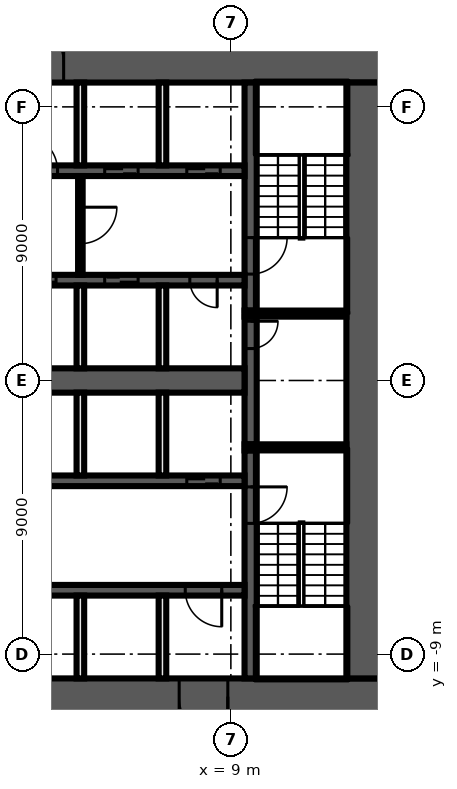
"""IFC4 building model, lengths in metres.
Left out: names, types, materials, properties, quantities, classifications, styles, units other than length and angle.
Written with IfcOpenShell. Run it as: python <this file> out.ifc"""

import sys

from ifc_helpers import new_model, si_unit, direction, frame, frame_2d, origin, place, context, subcontext, project, spatial, rectangle, extrude, element, fill, save


model = new_model("IFC4")
c1 = context("Model", 3, precision=1e-05, world=origin(), true_north=direction((0.0, 1.0)))
c2 = subcontext(c1, "Body", "Model", "MODEL_VIEW")
j1 = project(units=[si_unit("LENGTHUNIT", "METRE"), si_unit("PLANEANGLEUNIT", "RADIAN")], contexts=[c1])
p1 = place(None, origin())
s1 = spatial("IfcSite", under=j1, at=p1, CompositionType="ELEMENT")
p2 = place(p1, origin())
s2 = spatial("IfcBuilding", under=s1, at=p2, CompositionType="ELEMENT")
p3 = place(p2, frame((0.0, 0.0, 27.0)))
s3 = spatial("IfcBuildingStorey", under=s2, at=p3, CompositionType="ELEMENT", Elevation=27.0)
p4 = place(p3, frame((-14.0, 10.4, 0.0), z_axis=(0.0, 0.0, 1.0), x_axis=(1.0, 0.0, 0.0)))
e1 = element("IfcWall", 1, at=p4, inside=s3, PredefinedType="SHEAR", context=c2, shape_type="SweptSolid", body=[
    extrude(rectangle(XDim=28.0, YDim=1.2, at=frame_2d((14.0, 0.0))), origin(), (0.0, 0.0, 1.0), 5.55),
])
p5 = place(p4, frame((15.9, 0.0, 0.0)))
e2 = element("IfcOpeningElement", 2, at=p5, cuts=e1, PredefinedType="OPENING", context=c2, shape_type="SweptSolid", body=[
    extrude(rectangle(XDim=1.6, YDim=2.1, at=frame_2d((0.8, 1.05))), frame((0.0, 0.61, 0.0), z_axis=(0.0, -1.0, 0.0), x_axis=(1.0, 0.0, 0.0)), (0.0, 0.0, 1.0), 1.22),
])
p6 = place(p3, frame((14.0, -10.4, 0.0), z_axis=(0.0, 0.0, 1.0), x_axis=(-1.0, 0.0, 0.0)))
e3 = element("IfcWall", 3, at=p6, inside=s3, PredefinedType="SHEAR", context=c2, shape_type="SweptSolid", body=[
    extrude(rectangle(XDim=28.0, YDim=1.2, at=frame_2d((14.0, 0.0))), origin(), (0.0, 0.0, 1.0), 5.55),
])
p7 = place(p6, frame((5.1, 0.0, 0.0)))
e4 = element("IfcOpeningElement", 4, at=p7, cuts=e3, PredefinedType="OPENING", context=c2, shape_type="SweptSolid", body=[
    extrude(rectangle(XDim=1.6, YDim=2.1, at=frame_2d((0.8, 1.05))), frame((0.0, 0.61, 0.0), z_axis=(0.0, -1.0, 0.0), x_axis=(1.0, 0.0, 0.0)), (0.0, 0.0, 1.0), 1.22),
])
p8 = place(p3, frame((13.4, 9.8, 0.0), z_axis=(0.0, 0.0, 1.0), x_axis=(0.0, -1.0, 0.0)))
e5 = element("IfcWall", 5, at=p8, inside=s3, PredefinedType="SHEAR", context=c2, shape_type="SweptSolid", body=[
    extrude(rectangle(XDim=19.6, YDim=1.2, at=frame_2d((9.8, 0.0))), origin(), (0.0, 0.0, 1.0), 5.55),
])
p9 = place(p3, frame((9.65, -2.3, 0.0), z_axis=(0.0, 0.0, 1.0), x_axis=(0.0, -1.0, 0.0)))
e6 = element("IfcWall", 6, at=p9, inside=s3, PredefinedType="SHEAR", context=c2, shape_type="SweptSolid", body=[
    extrude(rectangle(XDim=7.5, YDim=0.4, at=frame_2d((3.75, 0.0))), origin(), (0.0, 0.0, 1.0), 5.55),
])
p10 = place(p9, frame((1.2, 0.0, 0.0)))
e7 = element("IfcOpeningElement", 7, at=p10, cuts=e6, PredefinedType="OPENING", context=c2, shape_type="SweptSolid", body=[
    extrude(rectangle(XDim=1.2, YDim=2.1, at=frame_2d((0.6, 1.05))), frame((0.0, 0.21, 0.0), z_axis=(0.0, -1.0, 0.0), x_axis=(1.0, 0.0, 0.0)), (0.0, 0.0, 1.0), 0.42),
])
p11 = place(p3, frame((9.65, 2.1, 0.0), z_axis=(0.0, 0.0, 1.0), x_axis=(0.0, -1.0, 0.0)))
e8 = element("IfcWall", 8, at=p11, inside=s3, PredefinedType="SHEAR", context=c2, shape_type="SweptSolid", body=[
    extrude(rectangle(XDim=4.2, YDim=0.4, at=frame_2d((2.1, 0.0))), origin(), (0.0, 0.0, 1.0), 5.55),
])
p12 = place(p11, frame((0.15, 0.0, 0.0)))
e9 = element("IfcOpeningElement", 9, at=p12, cuts=e8, PredefinedType="OPENING", context=c2, shape_type="SweptSolid", body=[
    extrude(rectangle(XDim=0.9, YDim=2.1, at=frame_2d((0.45, 1.05))), frame((0.0, 0.21, 0.0), z_axis=(0.0, -1.0, 0.0), x_axis=(1.0, 0.0, 0.0)), (0.0, 0.0, 1.0), 0.42),
])
p13 = place(p3, frame((9.65, 9.8, 0.0), z_axis=(0.0, 0.0, 1.0), x_axis=(0.0, -1.0, 0.0)))
e10 = element("IfcWall", 10, at=p13, inside=s3, PredefinedType="SHEAR", context=c2, shape_type="SweptSolid", body=[
    extrude(rectangle(XDim=7.5, YDim=0.4, at=frame_2d((3.75, 0.0))), origin(), (0.0, 0.0, 1.0), 5.55),
])
p14 = place(p13, frame((5.1, 0.0, 0.0)))
e11 = element("IfcOpeningElement", 11, at=p14, cuts=e10, PredefinedType="OPENING", context=c2, shape_type="SweptSolid", body=[
    extrude(rectangle(XDim=1.2, YDim=2.1, at=frame_2d((0.6, 1.05))), frame((0.0, 0.21, 0.0), z_axis=(0.0, -1.0, 0.0), x_axis=(1.0, 0.0, 0.0)), (0.0, 0.0, 1.0), 0.42),
])
for number, where, z_axis, x_axis in (
    (12, (9.45, 2.2, 0.0), (0.0, 0.0, 1.0), (1.0, 0.0, 0.0)),
    (13, (9.45, -2.2, 0.0), (0.0, 0.0, 1.0), (1.0, 0.0, 0.0)),
):
    element("IfcWall", number, at=place(p3, frame(where, z_axis=z_axis, x_axis=x_axis)), inside=s3, PredefinedType="SHEAR", context=c2, shape_type="SweptSolid", body=[
        extrude(rectangle(XDim=3.35, YDim=0.2, at=frame_2d((1.675, 0.0))), origin(), (0.0, 0.0, 1.0), 5.55),
    ])
p15 = place(p3, frame((-9.45, 6.9, 0.0), z_axis=(0.0, 0.0, 1.0), x_axis=(1.0, 0.0, 0.0)))
e14 = element("IfcWall", 14, at=p15, inside=s3, PredefinedType="SHEAR", context=c2, shape_type="SweptSolid", body=[
    extrude(rectangle(XDim=18.9, YDim=0.35, at=frame_2d((9.45, 0.0))), origin(), (0.0, 0.0, 1.0), 5.55),
])
p16 = place(p15, frame((0.8, 0.0, 0.0)))
e15 = element("IfcOpeningElement", 15, at=p16, cuts=e14, PredefinedType="OPENING", context=c2, shape_type="SweptSolid", body=[
    extrude(rectangle(XDim=1.1, YDim=2.1, at=frame_2d((0.55, 1.05))), frame((0.0, 0.185, 0.0), z_axis=(0.0, -1.0, 0.0), x_axis=(1.0, 0.0, 0.0)), (0.0, 0.0, 1.0), 0.37),
])
p17 = place(p15, frame((3.5, 0.0, 0.0)))
e16 = element("IfcOpeningElement", 16, at=p17, cuts=e14, PredefinedType="OPENING", context=c2, shape_type="SweptSolid", body=[
    extrude(rectangle(XDim=1.1, YDim=2.1, at=frame_2d((0.55, 1.05))), frame((0.0, 0.185, 0.0), z_axis=(0.0, -1.0, 0.0), x_axis=(1.0, 0.0, 0.0)), (0.0, 0.0, 1.0), 0.37),
])
p18 = place(p15, frame((6.2, 0.0, 0.0)))
e17 = element("IfcOpeningElement", 17, at=p18, cuts=e14, PredefinedType="OPENING", context=c2, shape_type="SweptSolid", body=[
    extrude(rectangle(XDim=1.1, YDim=2.1, at=frame_2d((0.55, 1.05))), frame((0.0, 0.185, 0.0), z_axis=(0.0, -1.0, 0.0), x_axis=(1.0, 0.0, 0.0)), (0.0, 0.0, 1.0), 0.37),
])
p19 = place(p15, frame((8.9, 0.0, 0.0)))
e18 = element("IfcOpeningElement", 18, at=p19, cuts=e14, PredefinedType="OPENING", context=c2, shape_type="SweptSolid", body=[
    extrude(rectangle(XDim=1.1, YDim=2.1, at=frame_2d((0.55, 1.05))), frame((0.0, 0.185, 0.0), z_axis=(0.0, -1.0, 0.0), x_axis=(1.0, 0.0, 0.0)), (0.0, 0.0, 1.0), 0.37),
])
p20 = place(p15, frame((11.55, 0.0, 0.0)))
e19 = element("IfcOpeningElement", 19, at=p20, cuts=e14, PredefinedType="OPENING", context=c2, shape_type="SweptSolid", body=[
    extrude(rectangle(XDim=1.2, YDim=2.1, at=frame_2d((0.6, 1.05))), frame((0.0, 0.185, 0.0), z_axis=(0.0, -1.0, 0.0), x_axis=(1.0, 0.0, 0.0)), (0.0, 0.0, 1.0), 0.37),
])
p21 = place(p15, frame((14.3, 0.0, 0.0)))
e20 = element("IfcOpeningElement", 20, at=p21, cuts=e14, PredefinedType="OPENING", context=c2, shape_type="SweptSolid", body=[
    extrude(rectangle(XDim=1.1, YDim=2.1, at=frame_2d((0.55, 1.05))), frame((0.0, 0.185, 0.0), z_axis=(0.0, -1.0, 0.0), x_axis=(1.0, 0.0, 0.0)), (0.0, 0.0, 1.0), 0.37),
])
p22 = place(p15, frame((17.0, 0.0, 0.0)))
e21 = element("IfcOpeningElement", 21, at=p22, cuts=e14, PredefinedType="OPENING", context=c2, shape_type="SweptSolid", body=[
    extrude(rectangle(XDim=1.1, YDim=2.1, at=frame_2d((0.55, 1.05))), frame((0.0, 0.185, 0.0), z_axis=(0.0, -1.0, 0.0), x_axis=(1.0, 0.0, 0.0)), (0.0, 0.0, 1.0), 0.37),
])
p23 = place(p3, frame((9.45, 3.3, 0.0), z_axis=(0.0, 0.0, 1.0), x_axis=(-1.0, 0.0, 0.0)))
e22 = element("IfcWall", 22, at=p23, inside=s3, PredefinedType="SHEAR", context=c2, shape_type="SweptSolid", body=[
    extrude(rectangle(XDim=18.9, YDim=0.35, at=frame_2d((9.45, 0.0))), origin(), (0.0, 0.0, 1.0), 5.55),
])
p24 = place(p23, frame((17.0, 0.0, 0.0)))
e23 = element("IfcOpeningElement", 23, at=p24, cuts=e22, PredefinedType="OPENING", context=c2, shape_type="SweptSolid", body=[
    extrude(rectangle(XDim=1.1, YDim=2.1, at=frame_2d((0.55, 1.05))), frame((0.0, 0.185, 0.0), z_axis=(0.0, -1.0, 0.0), x_axis=(1.0, 0.0, 0.0)), (0.0, 0.0, 1.0), 0.37),
])
p25 = place(p23, frame((14.3, 0.0, 0.0)))
e24 = element("IfcOpeningElement", 24, at=p25, cuts=e22, PredefinedType="OPENING", context=c2, shape_type="SweptSolid", body=[
    extrude(rectangle(XDim=1.1, YDim=2.1, at=frame_2d((0.55, 1.05))), frame((0.0, 0.185, 0.0), z_axis=(0.0, -1.0, 0.0), x_axis=(1.0, 0.0, 0.0)), (0.0, 0.0, 1.0), 0.37),
])
p26 = place(p23, frame((11.6, 0.0, 0.0)))
e25 = element("IfcOpeningElement", 25, at=p26, cuts=e22, PredefinedType="OPENING", context=c2, shape_type="SweptSolid", body=[
    extrude(rectangle(XDim=1.1, YDim=2.1, at=frame_2d((0.55, 1.05))), frame((0.0, 0.185, 0.0), z_axis=(0.0, -1.0, 0.0), x_axis=(1.0, 0.0, 0.0)), (0.0, 0.0, 1.0), 0.37),
])
p27 = place(p23, frame((8.9, 0.0, 0.0)))
e26 = element("IfcOpeningElement", 26, at=p27, cuts=e22, PredefinedType="OPENING", context=c2, shape_type="SweptSolid", body=[
    extrude(rectangle(XDim=1.1, YDim=2.1, at=frame_2d((0.55, 1.05))), frame((0.0, 0.185, 0.0), z_axis=(0.0, -1.0, 0.0), x_axis=(1.0, 0.0, 0.0)), (0.0, 0.0, 1.0), 0.37),
])
p28 = place(p23, frame((6.2, 0.0, 0.0)))
e27 = element("IfcOpeningElement", 27, at=p28, cuts=e22, PredefinedType="OPENING", context=c2, shape_type="SweptSolid", body=[
    extrude(rectangle(XDim=1.1, YDim=2.1, at=frame_2d((0.55, 1.05))), frame((0.0, 0.185, 0.0), z_axis=(0.0, -1.0, 0.0), x_axis=(1.0, 0.0, 0.0)), (0.0, 0.0, 1.0), 0.37),
])
p29 = place(p23, frame((3.5, 0.0, 0.0)))
e28 = element("IfcOpeningElement", 28, at=p29, cuts=e22, PredefinedType="OPENING", context=c2, shape_type="SweptSolid", body=[
    extrude(rectangle(XDim=1.1, YDim=2.1, at=frame_2d((0.55, 1.05))), frame((0.0, 0.185, 0.0), z_axis=(0.0, -1.0, 0.0), x_axis=(1.0, 0.0, 0.0)), (0.0, 0.0, 1.0), 0.37),
])
p30 = place(p23, frame((0.9, 0.0, 0.0)))
e29 = element("IfcOpeningElement", 29, at=p30, cuts=e22, PredefinedType="OPENING", context=c2, shape_type="SweptSolid", body=[
    extrude(rectangle(XDim=0.9, YDim=2.1, at=frame_2d((0.45, 1.05))), frame((0.0, 0.185, 0.0), z_axis=(0.0, -1.0, 0.0), x_axis=(1.0, 0.0, 0.0)), (0.0, 0.0, 1.0), 0.37),
])
p31 = place(p3, frame((-9.45, -3.3, 0.0), z_axis=(0.0, 0.0, 1.0), x_axis=(1.0, 0.0, 0.0)))
e30 = element("IfcWall", 30, at=p31, inside=s3, PredefinedType="SHEAR", context=c2, shape_type="SweptSolid", body=[
    extrude(rectangle(XDim=18.9, YDim=0.35, at=frame_2d((9.45, 0.0))), origin(), (0.0, 0.0, 1.0), 5.55),
])
p32 = place(p31, frame((17.0, 0.0, 0.0)))
e31 = element("IfcOpeningElement", 31, at=p32, cuts=e30, PredefinedType="OPENING", context=c2, shape_type="SweptSolid", body=[
    extrude(rectangle(XDim=1.1, YDim=2.1, at=frame_2d((0.55, 1.05))), frame((0.0, 0.185, 0.0), z_axis=(0.0, -1.0, 0.0), x_axis=(1.0, 0.0, 0.0)), (0.0, 0.0, 1.0), 0.37),
])
p33 = place(p31, frame((0.9, 0.0, 0.0)))
e32 = element("IfcOpeningElement", 32, at=p33, cuts=e30, PredefinedType="OPENING", context=c2, shape_type="SweptSolid", body=[
    extrude(rectangle(XDim=0.9, YDim=2.1, at=frame_2d((0.45, 1.05))), frame((0.0, 0.185, 0.0), z_axis=(0.0, -1.0, 0.0), x_axis=(1.0, 0.0, 0.0)), (0.0, 0.0, 1.0), 0.37),
])
p34 = place(p31, frame((3.6, 0.0, 0.0)))
e33 = element("IfcOpeningElement", 33, at=p34, cuts=e30, PredefinedType="OPENING", context=c2, shape_type="SweptSolid", body=[
    extrude(rectangle(XDim=0.9, YDim=2.1, at=frame_2d((0.45, 1.05))), frame((0.0, 0.185, 0.0), z_axis=(0.0, -1.0, 0.0), x_axis=(1.0, 0.0, 0.0)), (0.0, 0.0, 1.0), 0.37),
])
p35 = place(p31, frame((6.3, 0.0, 0.0)))
e34 = element("IfcOpeningElement", 34, at=p35, cuts=e30, PredefinedType="OPENING", context=c2, shape_type="SweptSolid", body=[
    extrude(rectangle(XDim=0.9, YDim=2.1, at=frame_2d((0.45, 1.05))), frame((0.0, 0.185, 0.0), z_axis=(0.0, -1.0, 0.0), x_axis=(1.0, 0.0, 0.0)), (0.0, 0.0, 1.0), 0.37),
])
p36 = place(p31, frame((9.0, 0.0, 0.0)))
e35 = element("IfcOpeningElement", 35, at=p36, cuts=e30, PredefinedType="OPENING", context=c2, shape_type="SweptSolid", body=[
    extrude(rectangle(XDim=0.9, YDim=2.1, at=frame_2d((0.45, 1.05))), frame((0.0, 0.185, 0.0), z_axis=(0.0, -1.0, 0.0), x_axis=(1.0, 0.0, 0.0)), (0.0, 0.0, 1.0), 0.37),
])
p37 = place(p3, frame((9.45, -6.9, 0.0), z_axis=(0.0, 0.0, 1.0), x_axis=(-1.0, 0.0, 0.0)))
e36 = element("IfcWall", 36, at=p37, inside=s3, PredefinedType="SHEAR", context=c2, shape_type="SweptSolid", body=[
    extrude(rectangle(XDim=18.9, YDim=0.35, at=frame_2d((9.45, 0.0))), origin(), (0.0, 0.0, 1.0), 5.55),
])
p38 = place(p37, frame((0.75, 0.0, 0.0)))
e37 = element("IfcOpeningElement", 37, at=p38, cuts=e36, PredefinedType="OPENING", context=c2, shape_type="SweptSolid", body=[
    extrude(rectangle(XDim=1.2, YDim=2.1, at=frame_2d((0.6, 1.05))), frame((0.0, 0.185, 0.0), z_axis=(0.0, -1.0, 0.0), x_axis=(1.0, 0.0, 0.0)), (0.0, 0.0, 1.0), 0.37),
])
p39 = place(p37, frame((17.1, 0.0, 0.0)))
e38 = element("IfcOpeningElement", 38, at=p39, cuts=e36, PredefinedType="OPENING", context=c2, shape_type="SweptSolid", body=[
    extrude(rectangle(XDim=0.9, YDim=2.1, at=frame_2d((0.45, 1.05))), frame((0.0, 0.185, 0.0), z_axis=(0.0, -1.0, 0.0), x_axis=(1.0, 0.0, 0.0)), (0.0, 0.0, 1.0), 0.37),
])
p40 = place(p37, frame((13.05, 0.0, 0.0)))
e39 = element("IfcOpeningElement", 39, at=p40, cuts=e36, PredefinedType="OPENING", context=c2, shape_type="SweptSolid", body=[
    extrude(rectangle(XDim=0.9, YDim=2.1, at=frame_2d((0.45, 1.05))), frame((0.0, 0.185, 0.0), z_axis=(0.0, -1.0, 0.0), x_axis=(1.0, 0.0, 0.0)), (0.0, 0.0, 1.0), 0.37),
])
p41 = place(p37, frame((9.0, 0.0, 0.0)))
e40 = element("IfcOpeningElement", 40, at=p41, cuts=e36, PredefinedType="OPENING", context=c2, shape_type="SweptSolid", body=[
    extrude(rectangle(XDim=0.9, YDim=2.1, at=frame_2d((0.45, 1.05))), frame((0.0, 0.185, 0.0), z_axis=(0.0, -1.0, 0.0), x_axis=(1.0, 0.0, 0.0)), (0.0, 0.0, 1.0), 0.37),
])
p42 = place(p3, frame((-9.45, 0.0, 0.0), z_axis=(0.0, 0.0, 1.0), x_axis=(1.0, 0.0, 0.0)))
e41 = element("IfcWall", 41, at=p42, inside=s3, PredefinedType="SHEAR", context=c2, shape_type="SweptSolid", body=[
    extrude(rectangle(XDim=18.9, YDim=0.8, at=frame_2d((9.45, 0.0))), origin(), (0.0, 0.0, 1.0), 5.55),
])
for number, where, z_axis, x_axis in (
    (42, (6.75, -9.8, 0.0), (0.0, 0.0, 1.0), (0.0, 1.0, 0.0)),
    (43, (6.75, -3.125, 0.0), (0.0, 0.0, 1.0), (0.0, 1.0, 0.0)),
    (44, (6.75, 0.4, 0.0), (0.0, 0.0, 1.0), (0.0, 1.0, 0.0)),
    (45, (6.75, 7.075, 0.0), (0.0, 0.0, 1.0), (0.0, 1.0, 0.0)),
):
    element("IfcWall", number, at=place(p3, frame(where, z_axis=z_axis, x_axis=x_axis)), inside=s3, PredefinedType="SOLIDWALL", context=c2, shape_type="SweptSolid", body=[
        extrude(rectangle(XDim=2.725, YDim=0.25, at=frame_2d((1.363, 0.0))), origin(), (0.0, 0.0, 1.0), 5.55),
    ])
p43 = place(p3, frame((4.05, 6.725, 0.0), z_axis=(0.0, 0.0, 1.0), x_axis=(0.0, -1.0, 0.0)))
e46 = element("IfcWall", 46, at=p43, inside=s3, PredefinedType="PARTITIONING", context=c2, shape_type="SweptSolid", body=[
    extrude(rectangle(XDim=3.25, YDim=0.15, at=frame_2d((1.625, 0.0))), origin(), (0.0, 0.0, 1.0), 5.55),
])
p44 = place(p43, frame((1.025, 0.0, 0.0)))
e47 = element("IfcOpeningElement", 47, at=p44, cuts=e46, PredefinedType="OPENING", context=c2, shape_type="SweptSolid", body=[
    extrude(rectangle(XDim=1.2, YDim=2.1, at=frame_2d((0.6, 1.05))), frame((0.0, 0.085, 0.0), z_axis=(0.0, -1.0, 0.0), x_axis=(1.0, 0.0, 0.0)), (0.0, 0.0, 1.0), 0.17),
])
for number, where, z_axis, x_axis in (
    (48, (4.05, -9.8, 0.0), (0.0, 0.0, 1.0), (0.0, 1.0, 0.0)),
    (49, (4.05, -3.125, 0.0), (0.0, 0.0, 1.0), (0.0, 1.0, 0.0)),
    (50, (4.05, 0.4, 0.0), (0.0, 0.0, 1.0), (0.0, 1.0, 0.0)),
    (51, (4.05, 7.075, 0.0), (0.0, 0.0, 1.0), (0.0, 1.0, 0.0)),
):
    element("IfcWall", number, at=place(p3, frame(where, z_axis=z_axis, x_axis=x_axis)), inside=s3, PredefinedType="SOLIDWALL", context=c2, shape_type="SweptSolid", body=[
        extrude(rectangle(XDim=2.725, YDim=0.25, at=frame_2d((1.363, 0.0))), origin(), (0.0, 0.0, 1.0), 5.55),
    ])
p45 = place(p12, origin())
e52 = element("IfcDoor", 52, at=p45, inside=s3, OperationType="SINGLE_SWING_RIGHT", PredefinedType="DOOR", context=c2, shape_type="SweptSolid", body=[
    extrude(rectangle(XDim=0.9, YDim=2.1, at=frame_2d((0.45, 1.05))), frame((0.0, 0.025, 0.0), z_axis=(0.0, -1.0, 0.0), x_axis=(1.0, 0.0, 0.0)), (0.0, 0.0, 1.0), 0.05),
])
fill(e9, e52)
p46 = place(p5, origin())
e53 = element("IfcDoor", 53, at=p46, inside=s3, OperationType="DOUBLE_DOOR_SINGLE_SWING", PredefinedType="DOOR", context=c2, shape_type="SweptSolid", body=[
    extrude(rectangle(XDim=1.6, YDim=2.1, at=frame_2d((0.8, 1.05))), frame((0.0, 0.025, 0.0), z_axis=(0.0, -1.0, 0.0), x_axis=(1.0, 0.0, 0.0)), (0.0, 0.0, 1.0), 0.05),
])
fill(e2, e53)
p47 = place(p20, origin())
e54 = element("IfcDoor", 54, at=p47, inside=s3, OperationType="SINGLE_SWING_LEFT", PredefinedType="DOOR", context=c2, shape_type="SweptSolid", body=[
    extrude(rectangle(XDim=1.2, YDim=2.1, at=frame_2d((0.6, 1.05))), frame((0.0, 0.025, 0.0), z_axis=(0.0, -1.0, 0.0), x_axis=(1.0, 0.0, 0.0)), (0.0, 0.0, 1.0), 0.05),
])
fill(e19, e54)
p48 = place(p21, origin())
e55 = element("IfcDoor", 55, at=p48, inside=s3, OperationType="DOUBLE_DOOR_SLIDING", PredefinedType="DOOR", context=c2, shape_type="SweptSolid", body=[
    extrude(rectangle(XDim=1.1, YDim=2.1, at=frame_2d((0.55, 1.05))), frame((0.0, 0.025, 0.0), z_axis=(0.0, -1.0, 0.0), x_axis=(1.0, 0.0, 0.0)), (0.0, 0.0, 1.0), 0.05),
])
fill(e20, e55)
p49 = place(p22, origin())
e56 = element("IfcDoor", 56, at=p49, inside=s3, OperationType="DOUBLE_DOOR_SLIDING", PredefinedType="DOOR", context=c2, shape_type="SweptSolid", body=[
    extrude(rectangle(XDim=1.1, YDim=2.1, at=frame_2d((0.55, 1.05))), frame((0.0, 0.025, 0.0), z_axis=(0.0, -1.0, 0.0), x_axis=(1.0, 0.0, 0.0)), (0.0, 0.0, 1.0), 0.05),
])
fill(e21, e56)
p50 = place(p28, origin())
e57 = element("IfcDoor", 57, at=p50, inside=s3, OperationType="DOUBLE_DOOR_SLIDING", PredefinedType="DOOR", context=c2, shape_type="SweptSolid", body=[
    extrude(rectangle(XDim=1.1, YDim=2.1, at=frame_2d((0.55, 1.05))), frame((0.0, 0.025, 0.0), z_axis=(0.0, -1.0, 0.0), x_axis=(1.0, 0.0, 0.0)), (0.0, 0.0, 1.0), 0.05),
])
fill(e27, e57)
p51 = place(p29, origin())
e58 = element("IfcDoor", 58, at=p51, inside=s3, OperationType="DOUBLE_DOOR_SLIDING", PredefinedType="DOOR", context=c2, shape_type="SweptSolid", body=[
    extrude(rectangle(XDim=1.1, YDim=2.1, at=frame_2d((0.55, 1.05))), frame((0.0, 0.025, 0.0), z_axis=(0.0, -1.0, 0.0), x_axis=(1.0, 0.0, 0.0)), (0.0, 0.0, 1.0), 0.05),
])
fill(e28, e58)
p52 = place(p30, origin())
e59 = element("IfcDoor", 59, at=p52, inside=s3, OperationType="SINGLE_SWING_LEFT", PredefinedType="DOOR", context=c2, shape_type="SweptSolid", body=[
    extrude(rectangle(XDim=0.9, YDim=2.1, at=frame_2d((0.45, 1.05))), frame((0.0, 0.025, 0.0), z_axis=(0.0, -1.0, 0.0), x_axis=(1.0, 0.0, 0.0)), (0.0, 0.0, 1.0), 0.05),
])
fill(e29, e59)
p53 = place(p32, origin())
e60 = element("IfcDoor", 60, at=p53, inside=s3, OperationType="DOUBLE_DOOR_SLIDING", PredefinedType="DOOR", context=c2, shape_type="SweptSolid", body=[
    extrude(rectangle(XDim=1.1, YDim=2.1, at=frame_2d((0.55, 1.05))), frame((0.0, 0.025, 0.0), z_axis=(0.0, -1.0, 0.0), x_axis=(1.0, 0.0, 0.0)), (0.0, 0.0, 1.0), 0.05),
])
fill(e31, e60)
p54 = place(p7, origin())
e61 = element("IfcDoor", 61, at=p54, inside=s3, OperationType="DOUBLE_DOOR_SINGLE_SWING", PredefinedType="DOOR", context=c2, shape_type="SweptSolid", body=[
    extrude(rectangle(XDim=1.6, YDim=2.1, at=frame_2d((0.8, 1.05))), frame((0.0, 0.025, 0.0), z_axis=(0.0, -1.0, 0.0), x_axis=(1.0, 0.0, 0.0)), (0.0, 0.0, 1.0), 0.05),
])
fill(e4, e61)
p55 = place(p38, origin())
e62 = element("IfcDoor", 62, at=p55, inside=s3, OperationType="SINGLE_SWING_LEFT", PredefinedType="DOOR", context=c2, shape_type="SweptSolid", body=[
    extrude(rectangle(XDim=1.2, YDim=2.1, at=frame_2d((0.6, 1.05))), frame((0.0, 0.025, 0.0), z_axis=(0.0, -1.0, 0.0), x_axis=(1.0, 0.0, 0.0)), (0.0, 0.0, 1.0), 0.05),
])
fill(e37, e62)
p56 = place(p14, origin())
e63 = element("IfcDoor", 63, at=p56, inside=s3, OperationType="SINGLE_SWING_LEFT", PredefinedType="DOOR", context=c2, shape_type="SweptSolid", body=[
    extrude(rectangle(XDim=1.2, YDim=2.1, at=frame_2d((0.6, 1.05))), frame((0.0, 0.025, 0.0), z_axis=(0.0, -1.0, 0.0), x_axis=(1.0, 0.0, 0.0)), (0.0, 0.0, 1.0), 0.05),
])
fill(e11, e63)
p57 = place(p10, origin())
e64 = element("IfcDoor", 64, at=p57, inside=s3, OperationType="SINGLE_SWING_RIGHT", PredefinedType="DOOR", context=c2, shape_type="SweptSolid", body=[
    extrude(rectangle(XDim=1.2, YDim=2.1, at=frame_2d((0.6, 1.05))), frame((0.0, 0.025, 0.0), z_axis=(0.0, -1.0, 0.0), x_axis=(1.0, 0.0, 0.0)), (0.0, 0.0, 1.0), 0.05),
])
fill(e7, e64)
p58 = place(p44, origin())
e65 = element("IfcDoor", 65, at=p58, inside=s3, OperationType="SINGLE_SWING_RIGHT", PredefinedType="DOOR", context=c2, shape_type="SweptSolid", body=[
    extrude(rectangle(XDim=1.2, YDim=2.1, at=frame_2d((0.6, 1.05))), frame((0.0, 0.025, 0.0), z_axis=(0.0, -1.0, 0.0), x_axis=(1.0, 0.0, 0.0)), (0.0, 0.0, 1.0), 0.05),
])
fill(e47, e65)
save(model, sys.argv[1])
